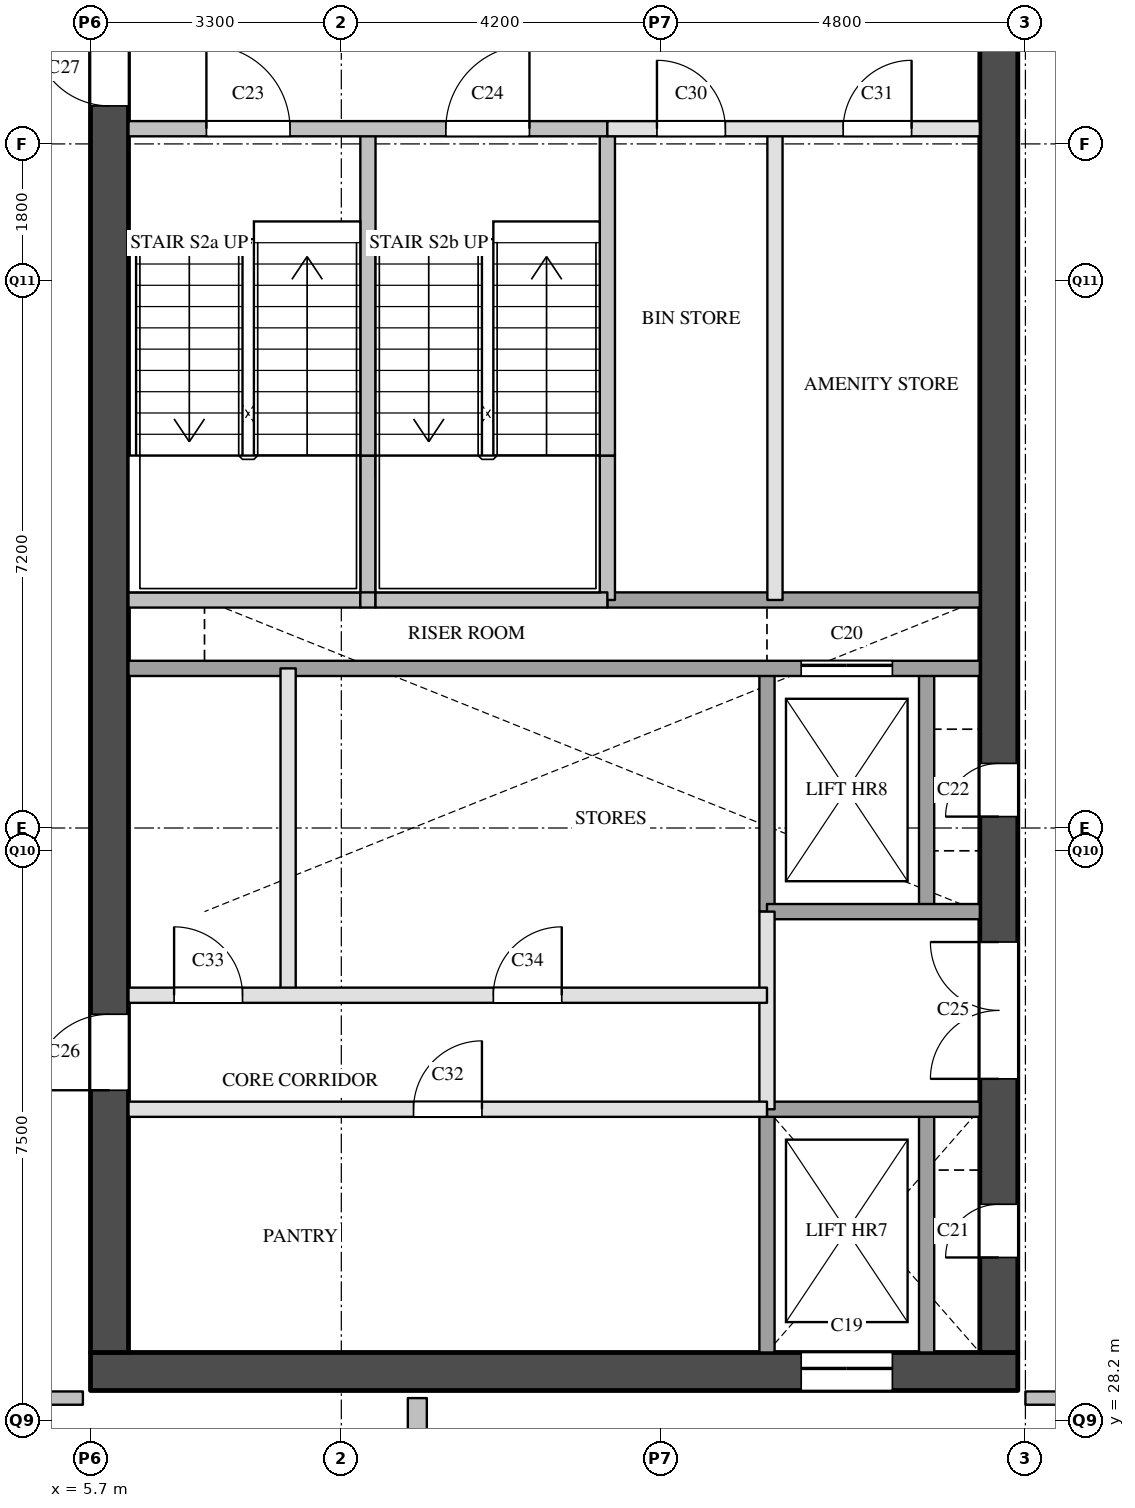
"""IFC4 building model, lengths in metres.
Left out: names, types, materials, properties, quantities, classifications, styles, units other than length and angle.
Written with IfcOpenShell. Run it as: python <this file> out.ifc"""

import sys

from ifc_helpers import new_model, si_unit, direction, frame, frame_2d, origin, place, context, subcontext, project, spatial, rectangle, extrude, element, fill, save


model = new_model("IFC4")
c1 = context("Model", 3, precision=1e-05, world=origin(), true_north=direction((0.0, 1.0)))
c2 = subcontext(c1, "Body", "Model", "MODEL_VIEW")
j1 = project(units=[si_unit("LENGTHUNIT", "METRE"), si_unit("PLANEANGLEUNIT", "RADIAN")], contexts=[c1])
p1 = place(None, origin())
s1 = spatial("IfcSite", under=j1, at=p1, CompositionType="ELEMENT")
p2 = place(p1, origin())
s2 = spatial("IfcBuilding", under=s1, at=p2, CompositionType="ELEMENT")
p3 = place(p2, frame((0.0, 0.0, 170.0)))
s3 = spatial("IfcBuildingStorey", under=s2, at=p3, CompositionType="ELEMENT", Elevation=170.0)
p4 = place(p3, frame((5.7, 28.85, 0.0), z_axis=(0.0, 0.0, 1.0), x_axis=(1.0, 0.0, 0.0)))
e1 = element("IfcWall", 1, at=p4, inside=s3, PredefinedType="SHEAR", context=c2, shape_type="SweptSolid", body=[
    extrude(rectangle(XDim=12.2, YDim=0.5, at=frame_2d((6.1, 0.0))), origin(), (0.0, 0.0, 1.0), 3.6),
])
p5 = place(p4, frame((9.35, 0.0, 0.0)))
e2 = element("IfcOpeningElement", 2, at=p5, cuts=e1, PredefinedType="OPENING", context=c2, shape_type="SweptSolid", body=[
    extrude(rectangle(XDim=1.2, YDim=2.1, at=frame_2d((0.6, 1.05))), frame((0.0, 0.26, 0.0), z_axis=(0.0, -1.0, 0.0), x_axis=(1.0, 0.0, 0.0)), (0.0, 0.0, 1.0), 0.52),
])
p6 = place(p3, frame((5.95, 29.1, 0.0), z_axis=(0.0, 0.0, 1.0), x_axis=(0.0, 1.0, 0.0)))
e3 = element("IfcWall", 3, at=p6, inside=s3, PredefinedType="SHEAR", context=c2, shape_type="SweptSolid", body=[
    extrude(rectangle(XDim=20.3, YDim=0.5, at=frame_2d((10.15, 0.0))), origin(), (0.0, 0.0, 1.0), 3.6),
])
p7 = place(p6, frame((3.45, 0.0, 0.0)))
e4 = element("IfcOpeningElement", 4, at=p7, cuts=e3, PredefinedType="OPENING", context=c2, shape_type="SweptSolid", body=[
    extrude(rectangle(XDim=1.0, YDim=2.1, at=frame_2d((0.5, 1.05))), frame((0.0, 0.26, 0.0), z_axis=(0.0, -1.0, 0.0), x_axis=(1.0, 0.0, 0.0)), (0.0, 0.0, 1.0), 0.52),
])
p8 = place(p6, frame((16.4, 0.0, 0.0)))
e5 = element("IfcOpeningElement", 5, at=p8, cuts=e3, PredefinedType="OPENING", context=c2, shape_type="SweptSolid", body=[
    extrude(rectangle(XDim=1.0, YDim=2.1, at=frame_2d((0.5, 1.05))), frame((0.0, 0.26, 0.0), z_axis=(0.0, -1.0, 0.0), x_axis=(1.0, 0.0, 0.0)), (0.0, 0.0, 1.0), 0.52),
])
p9 = place(p3, frame((17.65, 29.1, 0.0), z_axis=(0.0, 0.0, 1.0), x_axis=(0.0, 1.0, 0.0)))
e6 = element("IfcWall", 6, at=p9, inside=s3, PredefinedType="SHEAR", context=c2, shape_type="SweptSolid", body=[
    extrude(rectangle(XDim=20.3, YDim=0.5, at=frame_2d((10.15, 0.0))), origin(), (0.0, 0.0, 1.0), 3.6),
])
p10 = place(p9, frame((1.25, 0.0, 0.0)))
e7 = element("IfcOpeningElement", 7, at=p10, cuts=e6, PredefinedType="OPENING", context=c2, shape_type="SweptSolid", body=[
    extrude(rectangle(XDim=0.7, YDim=2.1, at=frame_2d((0.35, 1.05))), frame((0.0, 0.26, 0.0), z_axis=(0.0, -1.0, 0.0), x_axis=(1.0, 0.0, 0.0)), (0.0, 0.0, 1.0), 0.52),
])
p11 = place(p9, frame((7.05, 0.0, 0.0)))
e8 = element("IfcOpeningElement", 8, at=p11, cuts=e6, PredefinedType="OPENING", context=c2, shape_type="SweptSolid", body=[
    extrude(rectangle(XDim=0.7, YDim=2.1, at=frame_2d((0.35, 1.05))), frame((0.0, 0.26, 0.0), z_axis=(0.0, -1.0, 0.0), x_axis=(1.0, 0.0, 0.0)), (0.0, 0.0, 1.0), 0.52),
])
p12 = place(p9, frame((3.6, 0.0, 0.0)))
e9 = element("IfcOpeningElement", 9, at=p12, cuts=e6, PredefinedType="OPENING", context=c2, shape_type="SweptSolid", body=[
    extrude(rectangle(XDim=1.8, YDim=2.1, at=frame_2d((0.9, 1.05))), frame((0.0, 0.26, 0.0), z_axis=(0.0, -1.0, 0.0), x_axis=(1.0, 0.0, 0.0)), (0.0, 0.0, 1.0), 0.52),
])
p13 = place(p3, frame((8.3, 33.8, 0.0), z_axis=(0.0, 0.0, 1.0), x_axis=(0.0, 1.0, 0.0)))
e10 = element("IfcWall", 10, at=p13, inside=s3, PredefinedType="PARTITIONING", context=c2, shape_type="SweptSolid", body=[
    extrude(rectangle(XDim=4.3, YDim=0.2, at=frame_2d((2.15, 0.0))), origin(), (0.0, 0.0, 1.0), 3.6),
])
p14 = place(p3, frame((9.35, 39.0, 0.0), z_axis=(0.0, 0.0, 1.0), x_axis=(0.0, 1.0, 0.0)))
e11 = element("IfcWall", 11, at=p14, inside=s3, PredefinedType="SOLIDWALL", context=c2, shape_type="SweptSolid", body=[
    extrude(rectangle(XDim=1.9, YDim=0.2, at=frame_2d((0.95, 0.0))), origin(), (0.0, 0.0, 1.0), 3.6),
])
p15 = place(p3, frame((9.35, 40.9, 0.0), z_axis=(0.0, 0.0, 1.0), x_axis=(0.0, 1.0, 0.0)))
e12 = element("IfcWall", 12, at=p15, inside=s3, PredefinedType="SOLIDWALL", context=c2, shape_type="SweptSolid", body=[
    extrude(rectangle(XDim=4.3, YDim=0.2, at=frame_2d((2.15, 0.0))), origin(), (0.0, 0.0, 1.0), 3.6),
])
p16 = place(p3, frame((12.5, 39.0, 0.0), z_axis=(0.0, 0.0, 1.0), x_axis=(0.0, 1.0, 0.0)))
e13 = element("IfcWall", 13, at=p16, inside=s3, PredefinedType="SOLIDWALL", context=c2, shape_type="SweptSolid", body=[
    extrude(rectangle(XDim=1.9, YDim=0.2, at=frame_2d((0.95, 0.0))), origin(), (0.0, 0.0, 1.0), 3.6),
])
p17 = place(p3, frame((12.5, 40.9, 0.0), z_axis=(0.0, 0.0, 1.0), x_axis=(0.0, 1.0, 0.0)))
e14 = element("IfcWall", 14, at=p17, inside=s3, PredefinedType="SOLIDWALL", context=c2, shape_type="SweptSolid", body=[
    extrude(rectangle(XDim=4.3, YDim=0.2, at=frame_2d((2.15, 0.0))), origin(), (0.0, 0.0, 1.0), 3.6),
])
p18 = place(p3, frame((14.6, 32.3, 0.0), z_axis=(0.0, 0.0, 1.0), x_axis=(0.0, 1.0, 0.0)))
e15 = element("IfcWall", 15, at=p18, inside=s3, PredefinedType="PARTITIONING", context=c2, shape_type="SweptSolid", body=[
    extrude(rectangle(XDim=2.6, YDim=0.2, at=frame_2d((1.3, 0.0))), origin(), (0.0, 0.0, 1.0), 3.6),
])
p19 = place(p3, frame((14.6, 29.1, 0.0), z_axis=(0.0, 0.0, 1.0), x_axis=(0.0, 1.0, 0.0)))
e16 = element("IfcWall", 16, at=p19, inside=s3, PredefinedType="SOLIDWALL", context=c2, shape_type="SweptSolid", body=[
    extrude(rectangle(XDim=3.2, YDim=0.2, at=frame_2d((1.6, 0.0))), origin(), (0.0, 0.0, 1.0), 3.6),
])
p20 = place(p3, frame((14.6, 34.9, 0.0), z_axis=(0.0, 0.0, 1.0), x_axis=(0.0, 1.0, 0.0)))
e17 = element("IfcWall", 17, at=p20, inside=s3, PredefinedType="SOLIDWALL", context=c2, shape_type="SweptSolid", body=[
    extrude(rectangle(XDim=3.2, YDim=0.2, at=frame_2d((1.6, 0.0))), origin(), (0.0, 0.0, 1.0), 3.6),
])
p21 = place(p3, frame((14.705, 39.0, 0.0), z_axis=(0.0, 0.0, 1.0), x_axis=(0.0, 1.0, 0.0)))
e18 = element("IfcWall", 18, at=p21, inside=s3, PredefinedType="PARTITIONING", context=c2, shape_type="SweptSolid", body=[
    extrude(rectangle(XDim=6.2, YDim=0.2, at=frame_2d((3.1, 0.0))), origin(), (0.0, 0.0, 1.0), 3.6),
])
p22 = place(p3, frame((16.7, 29.1, 0.0), z_axis=(0.0, 0.0, 1.0), x_axis=(0.0, 1.0, 0.0)))
e19 = element("IfcWall", 19, at=p22, inside=s3, PredefinedType="SOLIDWALL", context=c2, shape_type="SweptSolid", body=[
    extrude(rectangle(XDim=3.2, YDim=0.2, at=frame_2d((1.6, 0.0))), origin(), (0.0, 0.0, 1.0), 3.6),
])
p23 = place(p3, frame((16.7, 34.9, 0.0), z_axis=(0.0, 0.0, 1.0), x_axis=(0.0, 1.0, 0.0)))
e20 = element("IfcWall", 20, at=p23, inside=s3, PredefinedType="SOLIDWALL", context=c2, shape_type="SweptSolid", body=[
    extrude(rectangle(XDim=3.2, YDim=0.2, at=frame_2d((1.6, 0.0))), origin(), (0.0, 0.0, 1.0), 3.6),
])
p24 = place(p3, frame((6.2, 32.3, 0.0), z_axis=(0.0, 0.0, 1.0), x_axis=(1.0, 0.0, 0.0)))
e21 = element("IfcWall", 21, at=p24, inside=s3, PredefinedType="PARTITIONING", context=c2, shape_type="SweptSolid", body=[
    extrude(rectangle(XDim=8.4, YDim=0.2, at=frame_2d((4.2, 0.0))), origin(), (0.0, 0.0, 1.0), 3.6),
])
p25 = place(p24, frame((3.75, 0.0, 0.0)))
e22 = element("IfcOpeningElement", 22, at=p25, cuts=e21, PredefinedType="OPENING", context=c2, shape_type="SweptSolid", body=[
    extrude(rectangle(XDim=0.9, YDim=2.1, at=frame_2d((0.45, 1.05))), frame((0.0, 0.11, 0.0), z_axis=(0.0, -1.0, 0.0), x_axis=(1.0, 0.0, 0.0)), (0.0, 0.0, 1.0), 0.22),
])
p26 = place(p3, frame((14.6, 32.3, 0.0), z_axis=(0.0, 0.0, 1.0), x_axis=(1.0, 0.0, 0.0)))
e23 = element("IfcWall", 23, at=p26, inside=s3, PredefinedType="SOLIDWALL", context=c2, shape_type="SweptSolid", body=[
    extrude(rectangle(XDim=2.8, YDim=0.2, at=frame_2d((1.4, 0.0))), origin(), (0.0, 0.0, 1.0), 3.6),
])
p27 = place(p3, frame((6.2, 33.8, 0.0), z_axis=(0.0, 0.0, 1.0), x_axis=(1.0, 0.0, 0.0)))
e24 = element("IfcWall", 24, at=p27, inside=s3, PredefinedType="PARTITIONING", context=c2, shape_type="SweptSolid", body=[
    extrude(rectangle(XDim=8.4, YDim=0.2, at=frame_2d((4.2, 0.0))), origin(), (0.0, 0.0, 1.0), 3.6),
])
p28 = place(p27, frame((0.6, 0.0, 0.0)))
e25 = element("IfcOpeningElement", 25, at=p28, cuts=e24, PredefinedType="OPENING", context=c2, shape_type="SweptSolid", body=[
    extrude(rectangle(XDim=0.9, YDim=2.1, at=frame_2d((0.45, 1.05))), frame((0.0, 0.11, 0.0), z_axis=(0.0, -1.0, 0.0), x_axis=(1.0, 0.0, 0.0)), (0.0, 0.0, 1.0), 0.22),
])
p29 = place(p27, frame((4.8, 0.0, 0.0)))
e26 = element("IfcOpeningElement", 26, at=p29, cuts=e24, PredefinedType="OPENING", context=c2, shape_type="SweptSolid", body=[
    extrude(rectangle(XDim=0.9, YDim=2.1, at=frame_2d((0.45, 1.05))), frame((0.0, 0.11, 0.0), z_axis=(0.0, -1.0, 0.0), x_axis=(1.0, 0.0, 0.0)), (0.0, 0.0, 1.0), 0.22),
])
p30 = place(p3, frame((14.6, 34.9, 0.0), z_axis=(0.0, 0.0, 1.0), x_axis=(1.0, 0.0, 0.0)))
e27 = element("IfcWall", 27, at=p30, inside=s3, PredefinedType="SOLIDWALL", context=c2, shape_type="SweptSolid", body=[
    extrude(rectangle(XDim=2.8, YDim=0.2, at=frame_2d((1.4, 0.0))), origin(), (0.0, 0.0, 1.0), 3.6),
])
p31 = place(p3, frame((6.2, 38.1, 0.0), z_axis=(0.0, 0.0, 1.0), x_axis=(1.0, 0.0, 0.0)))
e28 = element("IfcWall", 28, at=p31, inside=s3, PredefinedType="SOLIDWALL", context=c2, shape_type="SweptSolid", body=[
    extrude(rectangle(XDim=11.2, YDim=0.2, at=frame_2d((5.6, 0.0))), origin(), (0.0, 0.0, 1.0), 3.6),
])
p32 = place(p31, frame((8.85, 0.0, 0.0)))
e29 = element("IfcOpeningElement", 29, at=p32, cuts=e28, PredefinedType="OPENING", context=c2, shape_type="SweptSolid", body=[
    extrude(rectangle(XDim=1.2, YDim=2.1, at=frame_2d((0.6, 1.05))), frame((0.0, 0.11, 0.0), z_axis=(0.0, -1.0, 0.0), x_axis=(1.0, 0.0, 0.0)), (0.0, 0.0, 1.0), 0.22),
])
p33 = place(p3, frame((12.5, 39.0, 0.0), z_axis=(0.0, 0.0, 1.0), x_axis=(1.0, 0.0, 0.0)))
e30 = element("IfcWall", 30, at=p33, inside=s3, PredefinedType="SOLIDWALL", context=c2, shape_type="SweptSolid", body=[
    extrude(rectangle(XDim=4.9, YDim=0.2, at=frame_2d((2.45, 0.0))), origin(), (0.0, 0.0, 1.0), 3.6),
])
p34 = place(p3, frame((6.2, 39.0, 0.0), z_axis=(0.0, 0.0, 1.0), x_axis=(1.0, 0.0, 0.0)))
e31 = element("IfcWall", 31, at=p34, inside=s3, PredefinedType="SOLIDWALL", context=c2, shape_type="SweptSolid", body=[
    extrude(rectangle(XDim=3.05, YDim=0.2, at=frame_2d((1.525, 0.0))), origin(), (0.0, 0.0, 1.0), 3.6),
])
p35 = place(p3, frame((9.25, 39.0, 0.0), z_axis=(0.0, 0.0, 1.0), x_axis=(1.0, 0.0, 0.0)))
e32 = element("IfcWall", 32, at=p35, inside=s3, PredefinedType="SOLIDWALL", context=c2, shape_type="SweptSolid", body=[
    extrude(rectangle(XDim=0.2, YDim=0.2, at=frame_2d((0.1, 0.0))), origin(), (0.0, 0.0, 1.0), 3.6),
])
p36 = place(p3, frame((9.45, 39.0, 0.0), z_axis=(0.0, 0.0, 1.0), x_axis=(1.0, 0.0, 0.0)))
e33 = element("IfcWall", 33, at=p36, inside=s3, PredefinedType="SOLIDWALL", context=c2, shape_type="SweptSolid", body=[
    extrude(rectangle(XDim=3.05, YDim=0.2, at=frame_2d((1.525, 0.0))), origin(), (0.0, 0.0, 1.0), 3.6),
])
p37 = place(p3, frame((12.5, 45.2, 0.0), z_axis=(0.0, 0.0, 1.0), x_axis=(1.0, 0.0, 0.0)))
e34 = element("IfcWall", 34, at=p37, inside=s3, PredefinedType="PARTITIONING", context=c2, shape_type="SweptSolid", body=[
    extrude(rectangle(XDim=4.9, YDim=0.2, at=frame_2d((2.45, 0.0))), origin(), (0.0, 0.0, 1.0), 3.6),
])
p38 = place(p37, frame((0.653, 0.0, 0.0)))
e35 = element("IfcOpeningElement", 35, at=p38, cuts=e34, PredefinedType="OPENING", context=c2, shape_type="SweptSolid", body=[
    extrude(rectangle(XDim=0.9, YDim=2.1, at=frame_2d((0.45, 1.05))), frame((0.0, 0.11, 0.0), z_axis=(0.0, -1.0, 0.0), x_axis=(1.0, 0.0, 0.0)), (0.0, 0.0, 1.0), 0.22),
])
p39 = place(p37, frame((3.103, 0.0, 0.0)))
e36 = element("IfcOpeningElement", 36, at=p39, cuts=e34, PredefinedType="OPENING", context=c2, shape_type="SweptSolid", body=[
    extrude(rectangle(XDim=0.9, YDim=2.1, at=frame_2d((0.45, 1.05))), frame((0.0, 0.11, 0.0), z_axis=(0.0, -1.0, 0.0), x_axis=(1.0, 0.0, 0.0)), (0.0, 0.0, 1.0), 0.22),
])
p40 = place(p3, frame((6.2, 45.2, 0.0), z_axis=(0.0, 0.0, 1.0), x_axis=(1.0, 0.0, 0.0)))
e37 = element("IfcWall", 37, at=p40, inside=s3, PredefinedType="SOLIDWALL", context=c2, shape_type="SweptSolid", body=[
    extrude(rectangle(XDim=6.3, YDim=0.2, at=frame_2d((3.15, 0.0))), origin(), (0.0, 0.0, 1.0), 3.6),
])
p41 = place(p40, frame((1.025, 0.0, 0.0)))
e38 = element("IfcOpeningElement", 38, at=p41, cuts=e37, PredefinedType="OPENING", context=c2, shape_type="SweptSolid", body=[
    extrude(rectangle(XDim=1.1, YDim=2.1, at=frame_2d((0.55, 1.05))), frame((0.0, 0.11, 0.0), z_axis=(0.0, -1.0, 0.0), x_axis=(1.0, 0.0, 0.0)), (0.0, 0.0, 1.0), 0.22),
])
p42 = place(p40, frame((4.175, 0.0, 0.0)))
e39 = element("IfcOpeningElement", 39, at=p42, cuts=e37, PredefinedType="OPENING", context=c2, shape_type="SweptSolid", body=[
    extrude(rectangle(XDim=1.1, YDim=2.1, at=frame_2d((0.55, 1.05))), frame((0.0, 0.11, 0.0), z_axis=(0.0, -1.0, 0.0), x_axis=(1.0, 0.0, 0.0)), (0.0, 0.0, 1.0), 0.22),
])
p43 = place(p3, frame((3.8, 28.5, 0.0), z_axis=(0.0, 0.0, 1.0), x_axis=(1.0, 0.0, 0.0)))
e40 = element("IfcWall", 40, at=p43, inside=s3, PredefinedType="PARTITIONING", context=c2, shape_type="SweptSolid", body=[
    extrude(rectangle(XDim=1.8, YDim=0.175, at=frame_2d((0.9, 0.0))), origin(), (0.0, 0.0, 1.0), 3.6),
])
p44 = place(p3, frame((18.0, 28.5, 0.0), z_axis=(0.0, 0.0, 1.0), x_axis=(1.0, 0.0, 0.0)))
e41 = element("IfcWall", 41, at=p44, inside=s3, PredefinedType="PARTITIONING", context=c2, shape_type="SweptSolid", body=[
    extrude(rectangle(XDim=1.8, YDim=0.175, at=frame_2d((0.9, 0.0))), origin(), (0.0, 0.0, 1.0), 3.6),
])
p45 = place(p44, frame((0.59, 0.0, 0.0)))
e42 = element("IfcOpeningElement", 42, at=p45, cuts=e41, PredefinedType="OPENING", context=c2, shape_type="SweptSolid", body=[
    extrude(rectangle(XDim=0.9, YDim=2.1, at=frame_2d((0.45, 1.05))), frame((0.0, 0.097, 0.0), z_axis=(0.0, -1.0, 0.0), x_axis=(1.0, 0.0, 0.0)), (0.0, 0.0, 1.0), 0.195),
])
p46 = place(p3, frame((10.0, 27.0, 0.0), z_axis=(0.0, 0.0, 1.0), x_axis=(0.0, 1.0, 0.0)))
e43 = element("IfcWall", 43, at=p46, inside=s3, PredefinedType="PARTITIONING", context=c2, shape_type="SweptSolid", body=[
    extrude(rectangle(XDim=1.5, YDim=0.25, at=frame_2d((0.75, 0.0))), origin(), (0.0, 0.0, 1.0), 2.6),
])
p47 = place(p5, origin())
e44 = element("IfcDoor", 44, at=p47, inside=s3, OperationType="SLIDING_TO_LEFT", PredefinedType="DOOR", context=c2, shape_type="SweptSolid", body=[
    extrude(rectangle(XDim=1.2, YDim=2.1, at=frame_2d((0.6, 1.05))), frame((0.0, 0.025, 0.0), z_axis=(0.0, -1.0, 0.0), x_axis=(1.0, 0.0, 0.0)), (0.0, 0.0, 1.0), 0.05),
])
fill(e2, e44)
p48 = place(p32, origin())
e45 = element("IfcDoor", 45, at=p48, inside=s3, OperationType="SLIDING_TO_LEFT", PredefinedType="DOOR", context=c2, shape_type="SweptSolid", body=[
    extrude(rectangle(XDim=1.2, YDim=2.1, at=frame_2d((0.6, 1.05))), frame((0.0, 0.025, 0.0), z_axis=(0.0, -1.0, 0.0), x_axis=(1.0, 0.0, 0.0)), (0.0, 0.0, 1.0), 0.05),
])
fill(e29, e45)
p49 = place(p10, origin())
e46 = element("IfcDoor", 46, at=p49, inside=s3, OperationType="SINGLE_SWING_LEFT", PredefinedType="DOOR", context=c2, shape_type="SweptSolid", body=[
    extrude(rectangle(XDim=0.7, YDim=2.1, at=frame_2d((0.35, 1.05))), frame((0.0, 0.025, 0.0), z_axis=(0.0, -1.0, 0.0), x_axis=(1.0, 0.0, 0.0)), (0.0, 0.0, 1.0), 0.05),
])
fill(e7, e46)
p50 = place(p11, origin())
e47 = element("IfcDoor", 47, at=p50, inside=s3, OperationType="SINGLE_SWING_LEFT", PredefinedType="DOOR", context=c2, shape_type="SweptSolid", body=[
    extrude(rectangle(XDim=0.7, YDim=2.1, at=frame_2d((0.35, 1.05))), frame((0.0, 0.025, 0.0), z_axis=(0.0, -1.0, 0.0), x_axis=(1.0, 0.0, 0.0)), (0.0, 0.0, 1.0), 0.05),
])
fill(e8, e47)
p51 = place(p41, origin())
e48 = element("IfcDoor", 48, at=p51, inside=s3, OperationType="SINGLE_SWING_LEFT", PredefinedType="DOOR", context=c2, shape_type="SweptSolid", body=[
    extrude(rectangle(XDim=1.1, YDim=2.1, at=frame_2d((0.55, 1.05))), frame((0.0, 0.025, 0.0), z_axis=(0.0, -1.0, 0.0), x_axis=(1.0, 0.0, 0.0)), (0.0, 0.0, 1.0), 0.05),
])
fill(e38, e48)
p52 = place(p42, origin())
e49 = element("IfcDoor", 49, at=p52, inside=s3, OperationType="SINGLE_SWING_RIGHT", PredefinedType="DOOR", context=c2, shape_type="SweptSolid", body=[
    extrude(rectangle(XDim=1.1, YDim=2.1, at=frame_2d((0.55, 1.05))), frame((0.0, 0.025, 0.0), z_axis=(0.0, -1.0, 0.0), x_axis=(1.0, 0.0, 0.0)), (0.0, 0.0, 1.0), 0.05),
])
fill(e39, e49)
p53 = place(p12, origin())
e50 = element("IfcDoor", 50, at=p53, inside=s3, OperationType="DOUBLE_DOOR_SINGLE_SWING", PredefinedType="DOOR", context=c2, shape_type="SweptSolid", body=[
    extrude(rectangle(XDim=1.8, YDim=2.1, at=frame_2d((0.9, 1.05))), frame((0.0, 0.025, 0.0), z_axis=(0.0, -1.0, 0.0), x_axis=(1.0, 0.0, 0.0)), (0.0, 0.0, 1.0), 0.05),
])
fill(e9, e50)
p54 = place(p7, origin())
e51 = element("IfcDoor", 51, at=p54, inside=s3, OperationType="SINGLE_SWING_LEFT", PredefinedType="DOOR", context=c2, shape_type="SweptSolid", body=[
    extrude(rectangle(XDim=1.0, YDim=2.1, at=frame_2d((0.5, 1.05))), frame((0.0, 0.025, 0.0), z_axis=(0.0, -1.0, 0.0), x_axis=(1.0, 0.0, 0.0)), (0.0, 0.0, 1.0), 0.05),
])
fill(e4, e51)
p55 = place(p8, origin())
e52 = element("IfcDoor", 52, at=p55, inside=s3, OperationType="SINGLE_SWING_RIGHT", PredefinedType="DOOR", context=c2, shape_type="SweptSolid", body=[
    extrude(rectangle(XDim=1.0, YDim=2.1, at=frame_2d((0.5, 1.05))), frame((0.0, 0.025, 0.0), z_axis=(0.0, -1.0, 0.0), x_axis=(1.0, 0.0, 0.0)), (0.0, 0.0, 1.0), 0.05),
])
fill(e5, e52)
p56 = place(p38, origin())
e53 = element("IfcDoor", 53, at=p56, inside=s3, OperationType="SINGLE_SWING_LEFT", PredefinedType="DOOR", context=c2, shape_type="SweptSolid", body=[
    extrude(rectangle(XDim=0.9, YDim=2.1, at=frame_2d((0.45, 1.05))), frame((0.0, 0.025, 0.0), z_axis=(0.0, -1.0, 0.0), x_axis=(1.0, 0.0, 0.0)), (0.0, 0.0, 1.0), 0.05),
])
fill(e35, e53)
p57 = place(p39, origin())
e54 = element("IfcDoor", 54, at=p57, inside=s3, OperationType="SINGLE_SWING_RIGHT", PredefinedType="DOOR", context=c2, shape_type="SweptSolid", body=[
    extrude(rectangle(XDim=0.9, YDim=2.1, at=frame_2d((0.45, 1.05))), frame((0.0, 0.025, 0.0), z_axis=(0.0, -1.0, 0.0), x_axis=(1.0, 0.0, 0.0)), (0.0, 0.0, 1.0), 0.05),
])
fill(e36, e54)
p58 = place(p25, origin())
e55 = element("IfcDoor", 55, at=p58, inside=s3, OperationType="SINGLE_SWING_RIGHT", PredefinedType="DOOR", context=c2, shape_type="SweptSolid", body=[
    extrude(rectangle(XDim=0.9, YDim=2.1, at=frame_2d((0.45, 1.05))), frame((0.0, 0.025, 0.0), z_axis=(0.0, -1.0, 0.0), x_axis=(1.0, 0.0, 0.0)), (0.0, 0.0, 1.0), 0.05),
])
fill(e22, e55)
p59 = place(p28, origin())
e56 = element("IfcDoor", 56, at=p59, inside=s3, OperationType="SINGLE_SWING_LEFT", PredefinedType="DOOR", context=c2, shape_type="SweptSolid", body=[
    extrude(rectangle(XDim=0.9, YDim=2.1, at=frame_2d((0.45, 1.05))), frame((0.0, 0.025, 0.0), z_axis=(0.0, -1.0, 0.0), x_axis=(1.0, 0.0, 0.0)), (0.0, 0.0, 1.0), 0.05),
])
fill(e25, e56)
p60 = place(p29, origin())
e57 = element("IfcDoor", 57, at=p60, inside=s3, OperationType="SINGLE_SWING_RIGHT", PredefinedType="DOOR", context=c2, shape_type="SweptSolid", body=[
    extrude(rectangle(XDim=0.9, YDim=2.1, at=frame_2d((0.45, 1.05))), frame((0.0, 0.025, 0.0), z_axis=(0.0, -1.0, 0.0), x_axis=(1.0, 0.0, 0.0)), (0.0, 0.0, 1.0), 0.05),
])
fill(e26, e57)
save(model, sys.argv[1])
